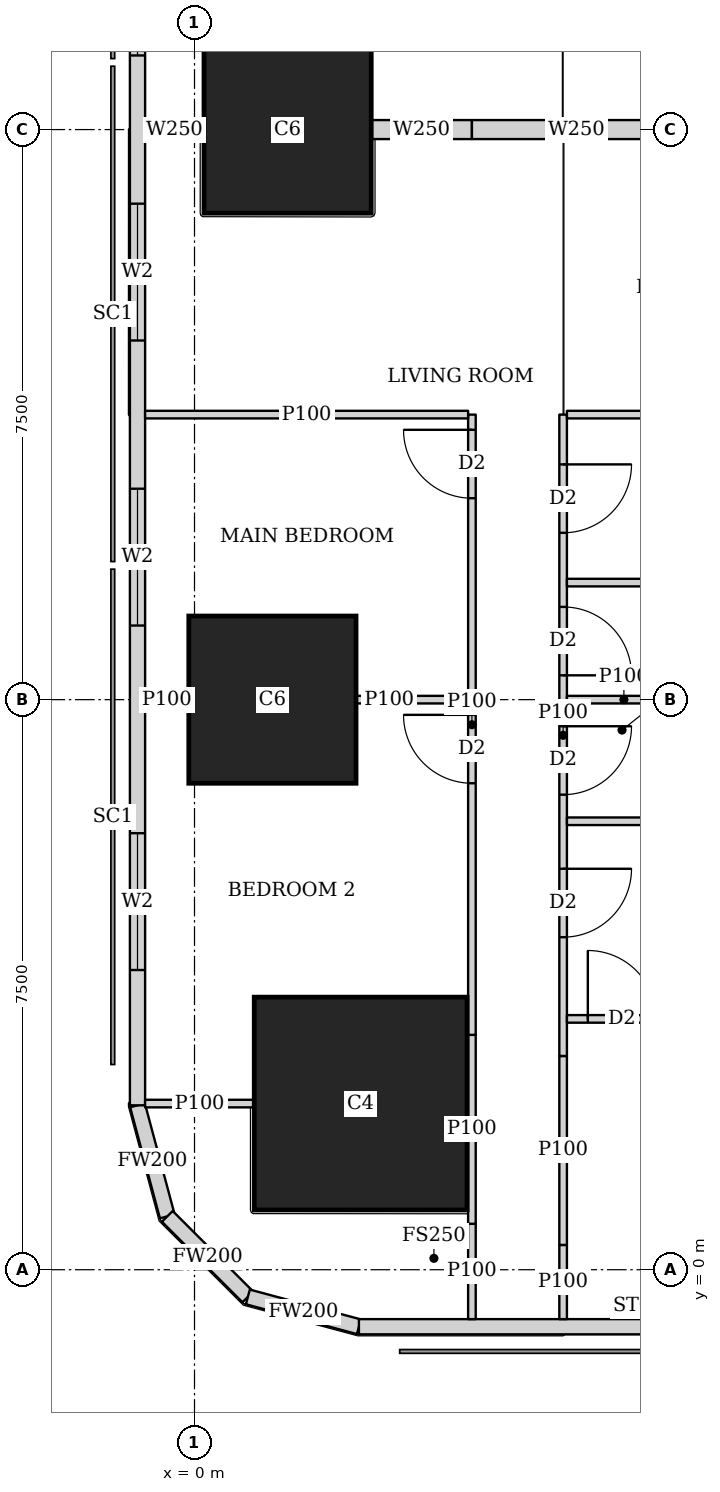
"""IFC4 building model, lengths in metres.
Left out: names, types, materials, properties, quantities, classifications, styles, units other than length and angle.
Written with IfcOpenShell. Run it as: python <this file> out.ifc"""

import sys

from ifc_helpers import new_model, si_unit, direction, frame, frame_2d, origin, origin_2d, place, context, subcontext, project, spatial, rectangle, extrude, element, fill, save


model = new_model("IFC4")
c1 = context("Model", 3, precision=1e-05, world=origin(), true_north=direction((0.0, 1.0)))
c2 = subcontext(c1, "Body", "Model", "MODEL_VIEW")
j1 = project(units=[si_unit("LENGTHUNIT", "METRE"), si_unit("PLANEANGLEUNIT", "RADIAN")], contexts=[c1])
p1 = place(None, origin())
s1 = spatial("IfcSite", under=j1, at=p1, CompositionType="ELEMENT")
p2 = place(p1, origin())
s2 = spatial("IfcBuilding", under=s1, at=p2, CompositionType="ELEMENT")
p3 = place(p2, frame((0.0, 0.0, 126.65)))
s3 = spatial("IfcBuildingStorey", under=s2, at=p3, CompositionType="ELEMENT", Elevation=126.65)
p4 = place(p3, frame((2.186, 2.186, 0.0), z_axis=(0.0, 0.0, 1.0), x_axis=(1.0, 0.0, 0.0)))
e1 = element("IfcColumn", 1, at=p4, inside=s3, PredefinedType="COLUMN", context=c2, shape_type="SweptSolid", body=[
    extrude(rectangle(XDim=2.8, YDim=2.8, at=origin_2d()), origin(), (0.0, 0.0, 1.0), 3.75),
])
for number, where, z_axis, x_axis in (
    (2, (1.025, 7.5, 0.0), (0.0, 0.0, 1.0), (1.0, 0.0, 0.0)),
    (3, (1.225, 15.0, 0.0), (0.0, 0.0, 1.0), (1.0, 0.0, 0.0)),
):
    element("IfcColumn", number, at=place(p3, frame(where, z_axis=z_axis, x_axis=x_axis)), inside=s3, PredefinedType="COLUMN", context=c2, shape_type="SweptSolid", body=[
        extrude(rectangle(XDim=2.2, YDim=2.2, at=origin_2d()), origin(), (0.0, 0.0, 1.0), 3.75),
    ])
p5 = place(p3, frame((2.163, -0.75, 0.0), z_axis=(0.0, 0.0, 1.0), x_axis=(1.0, 0.0, 0.0)))
e4 = element("IfcWall", 4, at=p5, inside=s3, PredefinedType="SOLIDWALL", context=c2, shape_type="SweptSolid", body=[
    extrude(rectangle(XDim=45.628, YDim=0.2, at=frame_2d((22.814, 0.0))), origin(), (0.0, 0.0, 1.0), 3.45),
])
p6 = place(p5, frame((9.537, 0.0, 0.9)))
e5 = element("IfcOpeningElement", 5, at=p6, cuts=e4, PredefinedType="OPENING", context=c2, shape_type="SweptSolid", body=[
    extrude(rectangle(XDim=1.8, YDim=1.5, at=frame_2d((0.9, 0.75))), frame((0.0, 0.11, 0.0), z_axis=(0.0, -1.0, 0.0), x_axis=(1.0, 0.0, 0.0)), (0.0, 0.0, 1.0), 0.22),
])
p7 = place(p5, frame((13.137, 0.0, 0.9)))
e6 = element("IfcOpeningElement", 6, at=p7, cuts=e4, PredefinedType="OPENING", context=c2, shape_type="SweptSolid", body=[
    extrude(rectangle(XDim=1.8, YDim=1.5, at=frame_2d((0.9, 0.75))), frame((0.0, 0.11, 0.0), z_axis=(0.0, -1.0, 0.0), x_axis=(1.0, 0.0, 0.0)), (0.0, 0.0, 1.0), 0.22),
])
p8 = place(p5, frame((16.737, 0.0, 0.9)))
e7 = element("IfcOpeningElement", 7, at=p8, cuts=e4, PredefinedType="OPENING", context=c2, shape_type="SweptSolid", body=[
    extrude(rectangle(XDim=1.8, YDim=1.5, at=frame_2d((0.9, 0.75))), frame((0.0, 0.11, 0.0), z_axis=(0.0, -1.0, 0.0), x_axis=(1.0, 0.0, 0.0)), (0.0, 0.0, 1.0), 0.22),
])
p9 = place(p5, frame((20.337, 0.0, 0.9)))
e8 = element("IfcOpeningElement", 8, at=p9, cuts=e4, PredefinedType="OPENING", context=c2, shape_type="SweptSolid", body=[
    extrude(rectangle(XDim=1.8, YDim=1.5, at=frame_2d((0.9, 0.75))), frame((0.0, 0.11, 0.0), z_axis=(0.0, -1.0, 0.0), x_axis=(1.0, 0.0, 0.0)), (0.0, 0.0, 1.0), 0.22),
])
p10 = place(p5, frame((23.937, 0.0, 0.9)))
e9 = element("IfcOpeningElement", 9, at=p10, cuts=e4, PredefinedType="OPENING", context=c2, shape_type="SweptSolid", body=[
    extrude(rectangle(XDim=1.8, YDim=1.5, at=frame_2d((0.9, 0.75))), frame((0.0, 0.11, 0.0), z_axis=(0.0, -1.0, 0.0), x_axis=(1.0, 0.0, 0.0)), (0.0, 0.0, 1.0), 0.22),
])
p11 = place(p5, frame((27.537, 0.0, 0.9)))
e10 = element("IfcOpeningElement", 10, at=p11, cuts=e4, PredefinedType="OPENING", context=c2, shape_type="SweptSolid", body=[
    extrude(rectangle(XDim=1.8, YDim=1.5, at=frame_2d((0.9, 0.75))), frame((0.0, 0.11, 0.0), z_axis=(0.0, -1.0, 0.0), x_axis=(1.0, 0.0, 0.0)), (0.0, 0.0, 1.0), 0.22),
])
p12 = place(p5, frame((31.137, 0.0, 0.9)))
e11 = element("IfcOpeningElement", 11, at=p12, cuts=e4, PredefinedType="OPENING", context=c2, shape_type="SweptSolid", body=[
    extrude(rectangle(XDim=1.8, YDim=1.5, at=frame_2d((0.9, 0.75))), frame((0.0, 0.11, 0.0), z_axis=(0.0, -1.0, 0.0), x_axis=(1.0, 0.0, 0.0)), (0.0, 0.0, 1.0), 0.22),
])
p13 = place(p5, frame((34.737, 0.0, 0.9)))
e12 = element("IfcOpeningElement", 12, at=p13, cuts=e4, PredefinedType="OPENING", context=c2, shape_type="SweptSolid", body=[
    extrude(rectangle(XDim=1.8, YDim=1.5, at=frame_2d((0.9, 0.75))), frame((0.0, 0.11, 0.0), z_axis=(0.0, -1.0, 0.0), x_axis=(1.0, 0.0, 0.0)), (0.0, 0.0, 1.0), 0.22),
])
p14 = place(p3, frame((-0.75, 42.837, 0.0), z_axis=(0.0, 0.0, 1.0), x_axis=(0.0, -1.0, 0.0)))
e13 = element("IfcWall", 13, at=p14, inside=s3, PredefinedType="SOLIDWALL", context=c2, shape_type="SweptSolid", body=[
    extrude(rectangle(XDim=40.674, YDim=0.2, at=frame_2d((20.337, 0.0))), origin(), (0.0, 0.0, 1.0), 3.45),
])
p15 = place(p14, frame((1.78, 0.0, 0.9)))
e14 = element("IfcOpeningElement", 14, at=p15, cuts=e13, PredefinedType="OPENING", context=c2, shape_type="SweptSolid", body=[
    extrude(rectangle(XDim=1.8, YDim=1.5, at=frame_2d((0.9, 0.75))), frame((0.0, 0.11, 0.0), z_axis=(0.0, -1.0, 0.0), x_axis=(1.0, 0.0, 0.0)), (0.0, 0.0, 1.0), 0.22),
])
p16 = place(p14, frame((6.312, 0.0, 0.9)))
e15 = element("IfcOpeningElement", 15, at=p16, cuts=e13, PredefinedType="OPENING", context=c2, shape_type="SweptSolid", body=[
    extrude(rectangle(XDim=1.8, YDim=1.5, at=frame_2d((0.9, 0.75))), frame((0.0, 0.11, 0.0), z_axis=(0.0, -1.0, 0.0), x_axis=(1.0, 0.0, 0.0)), (0.0, 0.0, 1.0), 0.22),
])
p17 = place(p14, frame((10.062, 0.0, 0.9)))
e16 = element("IfcOpeningElement", 16, at=p17, cuts=e13, PredefinedType="OPENING", context=c2, shape_type="SweptSolid", body=[
    extrude(rectangle(XDim=1.8, YDim=1.5, at=frame_2d((0.9, 0.75))), frame((0.0, 0.11, 0.0), z_axis=(0.0, -1.0, 0.0), x_axis=(1.0, 0.0, 0.0)), (0.0, 0.0, 1.0), 0.22),
])
p18 = place(p14, frame((13.812, 0.0, 0.9)))
e17 = element("IfcOpeningElement", 17, at=p18, cuts=e13, PredefinedType="OPENING", context=c2, shape_type="SweptSolid", body=[
    extrude(rectangle(XDim=1.8, YDim=1.5, at=frame_2d((0.9, 0.75))), frame((0.0, 0.11, 0.0), z_axis=(0.0, -1.0, 0.0), x_axis=(1.0, 0.0, 0.0)), (0.0, 0.0, 1.0), 0.22),
])
p19 = place(p14, frame((17.562, 0.0, 0.9)))
e18 = element("IfcOpeningElement", 18, at=p19, cuts=e13, PredefinedType="OPENING", context=c2, shape_type="SweptSolid", body=[
    extrude(rectangle(XDim=1.8, YDim=1.5, at=frame_2d((0.9, 0.75))), frame((0.0, 0.11, 0.0), z_axis=(0.0, -1.0, 0.0), x_axis=(1.0, 0.0, 0.0)), (0.0, 0.0, 1.0), 0.22),
])
p20 = place(p14, frame((21.312, 0.0, 0.9)))
e19 = element("IfcOpeningElement", 19, at=p20, cuts=e13, PredefinedType="OPENING", context=c2, shape_type="SweptSolid", body=[
    extrude(rectangle(XDim=1.8, YDim=1.5, at=frame_2d((0.9, 0.75))), frame((0.0, 0.11, 0.0), z_axis=(0.0, -1.0, 0.0), x_axis=(1.0, 0.0, 0.0)), (0.0, 0.0, 1.0), 0.22),
])
p21 = place(p14, frame((25.062, 0.0, 0.9)))
e20 = element("IfcOpeningElement", 20, at=p21, cuts=e13, PredefinedType="OPENING", context=c2, shape_type="SweptSolid", body=[
    extrude(rectangle(XDim=1.8, YDim=1.5, at=frame_2d((0.9, 0.75))), frame((0.0, 0.11, 0.0), z_axis=(0.0, -1.0, 0.0), x_axis=(1.0, 0.0, 0.0)), (0.0, 0.0, 1.0), 0.22),
])
p22 = place(p14, frame((28.812, 0.0, 0.9)))
e21 = element("IfcOpeningElement", 21, at=p22, cuts=e13, PredefinedType="OPENING", context=c2, shape_type="SweptSolid", body=[
    extrude(rectangle(XDim=1.8, YDim=1.5, at=frame_2d((0.9, 0.75))), frame((0.0, 0.11, 0.0), z_axis=(0.0, -1.0, 0.0), x_axis=(1.0, 0.0, 0.0)), (0.0, 0.0, 1.0), 0.22),
])
p23 = place(p14, frame((32.562, 0.0, 0.9)))
e22 = element("IfcOpeningElement", 22, at=p23, cuts=e13, PredefinedType="OPENING", context=c2, shape_type="SweptSolid", body=[
    extrude(rectangle(XDim=1.8, YDim=1.5, at=frame_2d((0.9, 0.75))), frame((0.0, 0.11, 0.0), z_axis=(0.0, -1.0, 0.0), x_axis=(1.0, 0.0, 0.0)), (0.0, 0.0, 1.0), 0.22),
])
p24 = place(p14, frame((37.094, 0.0, 0.9)))
e23 = element("IfcOpeningElement", 23, at=p24, cuts=e13, PredefinedType="OPENING", context=c2, shape_type="SweptSolid", body=[
    extrude(rectangle(XDim=1.8, YDim=1.5, at=frame_2d((0.9, 0.75))), frame((0.0, 0.11, 0.0), z_axis=(0.0, -1.0, 0.0), x_axis=(1.0, 0.0, 0.0)), (0.0, 0.0, 1.0), 0.22),
])
p25 = place(p3, frame((-0.75, 2.163, 0.0), z_axis=(0.0, 0.0, 1.0), x_axis=(0.259168954497, -0.965832000415, 0.0)))
e24 = element("IfcWall", 24, at=p25, inside=s3, PredefinedType="SOLIDWALL", context=c2, shape_type="SweptSolid", body=[
    extrude(rectangle(XDim=1.513, YDim=0.2, at=frame_2d((0.756, 0.0))), origin(), (0.0, 0.0, 1.0), 3.45),
])
p26 = place(p3, frame((-0.358, 0.702, 0.0), z_axis=(0.0, 0.0, 1.0), x_axis=(0.707106781187, -0.707106781187, 0.0)))
e25 = element("IfcWall", 25, at=p26, inside=s3, PredefinedType="SOLIDWALL", context=c2, shape_type="SweptSolid", body=[
    extrude(rectangle(XDim=1.499, YDim=0.2, at=frame_2d((0.75, 0.0))), origin(), (0.0, 0.0, 1.0), 3.45),
])
p27 = place(p3, frame((0.702, -0.358, 0.0), z_axis=(0.0, 0.0, 1.0), x_axis=(0.965832000415, -0.259168954497, 0.0)))
e26 = element("IfcWall", 26, at=p27, inside=s3, PredefinedType="SOLIDWALL", context=c2, shape_type="SweptSolid", body=[
    extrude(rectangle(XDim=1.513, YDim=0.2, at=frame_2d((0.756, 0.0))), origin(), (0.0, 0.0, 1.0), 3.45),
])
p28 = place(p3, frame((3.65, -0.65, 0.0), z_axis=(0.0, 0.0, 1.0), x_axis=(0.0, 1.0, 0.0)))
e27 = element("IfcWall", 27, at=p28, inside=s3, PredefinedType="PARTITIONING", context=c2, shape_type="SweptSolid", body=[
    extrude(rectangle(XDim=1.254, YDim=0.1, at=frame_2d((0.627, 0.0))), origin(), (0.0, 0.0, 1.0), 3.45),
])
p29 = place(p3, frame((3.65, 0.604, 0.0), z_axis=(0.0, 0.0, 1.0), x_axis=(0.0, 1.0, 0.0)))
e28 = element("IfcWall", 28, at=p29, inside=s3, PredefinedType="PARTITIONING", context=c2, shape_type="SweptSolid", body=[
    extrude(rectangle(XDim=2.486, YDim=0.1, at=frame_2d((1.243, 0.0))), origin(), (0.0, 0.0, 1.0), 2.0),
])
p30 = place(p3, frame((3.65, 3.09, 0.0), z_axis=(0.0, 0.0, 1.0), x_axis=(0.0, 1.0, 0.0)))
e29 = element("IfcWall", 29, at=p30, inside=s3, PredefinedType="PARTITIONING", context=c2, shape_type="SweptSolid", body=[
    extrude(rectangle(XDim=8.16, YDim=0.1, at=frame_2d((4.08, 0.0))), origin(), (0.0, 0.0, 1.0), 3.45),
])
p31 = place(p30, frame((7.06, 0.0, 0.0)))
e30 = element("IfcOpeningElement", 30, at=p31, cuts=e29, PredefinedType="OPENING", context=c2, shape_type="SweptSolid", body=[
    extrude(rectangle(XDim=0.9, YDim=2.1, at=frame_2d((0.45, 1.05))), frame((0.0, 0.06, 0.0), z_axis=(0.0, -1.0, 0.0), x_axis=(1.0, 0.0, 0.0)), (0.0, 0.0, 1.0), 0.12),
])
p32 = place(p30, frame((3.31, 0.0, 0.0)))
e31 = element("IfcOpeningElement", 31, at=p32, cuts=e29, PredefinedType="OPENING", context=c2, shape_type="SweptSolid", body=[
    extrude(rectangle(XDim=0.9, YDim=2.1, at=frame_2d((0.45, 1.05))), frame((0.0, 0.06, 0.0), z_axis=(0.0, -1.0, 0.0), x_axis=(1.0, 0.0, 0.0)), (0.0, 0.0, 1.0), 0.12),
])
p33 = place(p3, frame((4.85, -0.65, 0.0), z_axis=(0.0, 0.0, 1.0), x_axis=(0.0, 1.0, 0.0)))
e32 = element("IfcWall", 32, at=p33, inside=s3, PredefinedType="PARTITIONING", context=c2, shape_type="SweptSolid", body=[
    extrude(rectangle(XDim=0.976, YDim=0.1, at=frame_2d((0.488, 0.0))), origin(), (0.0, 0.0, 1.0), 3.45),
])
p34 = place(p3, frame((4.85, 0.326, 0.0), z_axis=(0.0, 0.0, 1.0), x_axis=(0.0, 1.0, 0.0)))
e33 = element("IfcWall", 33, at=p34, inside=s3, PredefinedType="PARTITIONING", context=c2, shape_type="SweptSolid", body=[
    extrude(rectangle(XDim=2.486, YDim=0.1, at=frame_2d((1.243, 0.0))), origin(), (0.0, 0.0, 1.0), 2.0),
])
p35 = place(p3, frame((4.85, 2.812, 0.0), z_axis=(0.0, 0.0, 1.0), x_axis=(0.0, 1.0, 0.0)))
e34 = element("IfcWall", 34, at=p35, inside=s3, PredefinedType="PARTITIONING", context=c2, shape_type="SweptSolid", body=[
    extrude(rectangle(XDim=8.438, YDim=0.1, at=frame_2d((4.219, 0.0))), origin(), (0.0, 0.0, 1.0), 3.45),
])
p36 = place(p35, frame((6.883, 0.0, 0.0)))
e35 = element("IfcOpeningElement", 35, at=p36, cuts=e34, PredefinedType="OPENING", context=c2, shape_type="SweptSolid", body=[
    extrude(rectangle(XDim=0.9, YDim=2.1, at=frame_2d((0.45, 1.05))), frame((0.0, 0.06, 0.0), z_axis=(0.0, -1.0, 0.0), x_axis=(1.0, 0.0, 0.0)), (0.0, 0.0, 1.0), 0.12),
])
p37 = place(p35, frame((3.438, 0.0, 0.0)))
e36 = element("IfcOpeningElement", 36, at=p37, cuts=e34, PredefinedType="OPENING", context=c2, shape_type="SweptSolid", body=[
    extrude(rectangle(XDim=0.9, YDim=2.1, at=frame_2d((0.45, 1.05))), frame((0.0, 0.06, 0.0), z_axis=(0.0, -1.0, 0.0), x_axis=(1.0, 0.0, 0.0)), (0.0, 0.0, 1.0), 0.12),
])
p38 = place(p35, frame((5.008, 0.0, 0.0)))
e37 = element("IfcOpeningElement", 37, at=p38, cuts=e34, PredefinedType="OPENING", context=c2, shape_type="SweptSolid", body=[
    extrude(rectangle(XDim=0.9, YDim=2.1, at=frame_2d((0.45, 1.05))), frame((0.0, 0.06, 0.0), z_axis=(0.0, -1.0, 0.0), x_axis=(1.0, 0.0, 0.0)), (0.0, 0.0, 1.0), 0.12),
])
p39 = place(p35, frame((1.563, 0.0, 0.0)))
e38 = element("IfcOpeningElement", 38, at=p39, cuts=e34, PredefinedType="OPENING", context=c2, shape_type="SweptSolid", body=[
    extrude(rectangle(XDim=0.9, YDim=2.1, at=frame_2d((0.45, 1.05))), frame((0.0, 0.06, 0.0), z_axis=(0.0, -1.0, 0.0), x_axis=(1.0, 0.0, 0.0)), (0.0, 0.0, 1.0), 0.12),
])
p40 = place(p3, frame((-0.65, 2.186, 0.0), z_axis=(0.0, 0.0, 1.0), x_axis=(1.0, 0.0, 0.0)))
e39 = element("IfcWall", 39, at=p40, inside=s3, PredefinedType="PARTITIONING", context=c2, shape_type="SweptSolid", body=[
    extrude(rectangle(XDim=1.435, YDim=0.1, at=frame_2d((0.717, 0.0))), origin(), (0.0, 0.0, 1.0), 3.45),
])
p41 = place(p3, frame((-0.65, 7.5, 0.0), z_axis=(0.0, 0.0, 1.0), x_axis=(1.0, 0.0, 0.0)))
e40 = element("IfcWall", 40, at=p41, inside=s3, PredefinedType="PARTITIONING", context=c2, shape_type="SweptSolid", body=[
    extrude(rectangle(XDim=0.574, YDim=0.1, at=frame_2d((0.287, 0.0))), origin(), (0.0, 0.0, 1.0), 2.0),
])
p42 = place(p3, frame((2.126, 7.5, 0.0), z_axis=(0.0, 0.0, 1.0), x_axis=(1.0, 0.0, 0.0)))
e41 = element("IfcWall", 41, at=p42, inside=s3, PredefinedType="PARTITIONING", context=c2, shape_type="SweptSolid", body=[
    extrude(rectangle(XDim=1.474, YDim=0.1, at=frame_2d((0.737, 0.0))), origin(), (0.0, 0.0, 1.0), 2.0),
])
p43 = place(p3, frame((-0.65, 11.25, 0.0), z_axis=(0.0, 0.0, 1.0), x_axis=(1.0, 0.0, 0.0)))
e42 = element("IfcWall", 42, at=p43, inside=s3, PredefinedType="PARTITIONING", context=c2, shape_type="SweptSolid", body=[
    extrude(rectangle(XDim=4.25, YDim=0.1, at=frame_2d((2.125, 0.0))), origin(), (0.0, 0.0, 1.0), 2.15),
])
p44 = place(p3, frame((4.9, 7.5, 0.0), z_axis=(0.0, 0.0, 1.0), x_axis=(1.0, 0.0, 0.0)))
e43 = element("IfcWall", 43, at=p44, inside=s3, PredefinedType="PARTITIONING", context=c2, shape_type="SweptSolid", body=[
    extrude(rectangle(XDim=1.499, YDim=0.1, at=frame_2d((0.75, 0.0))), origin(), (0.0, 0.0, 1.0), 3.45),
])
for number, where, z_axis, x_axis in (
    (44, (4.9, 11.25, 0.0), (0.0, 0.0, 1.0), (1.0, 0.0, 0.0)),
    (45, (4.9, 9.04, 0.0), (0.0, 0.0, 1.0), (1.0, 0.0, 0.0)),
    (46, (4.9, 5.9, 0.0), (0.0, 0.0, 1.0), (1.0, 0.0, 0.0)),
):
    element("IfcWall", number, at=place(p3, frame(where, z_axis=z_axis, x_axis=x_axis)), inside=s3, PredefinedType="PARTITIONING", context=c2, shape_type="SweptSolid", body=[
        extrude(rectangle(XDim=3.275, YDim=0.1, at=frame_2d((1.638, 0.0))), origin(), (0.0, 0.0, 1.0), 3.45),
    ])
p45 = place(p3, frame((-0.65, 15.0, 0.0), z_axis=(0.0, 0.0, 1.0), x_axis=(1.0, 0.0, 0.0)))
e47 = element("IfcWall", 47, at=p45, inside=s3, PredefinedType="SOLIDWALL", context=c2, shape_type="SweptSolid", body=[
    extrude(rectangle(XDim=0.774, YDim=0.25, at=frame_2d((0.387, 0.0))), origin(), (0.0, 0.0, 1.0), 3.45),
])
p46 = place(p3, frame((2.326, 15.0, 0.0), z_axis=(0.0, 0.0, 1.0), x_axis=(1.0, 0.0, 0.0)))
e48 = element("IfcWall", 48, at=p46, inside=s3, PredefinedType="SOLIDWALL", context=c2, shape_type="SweptSolid", body=[
    extrude(rectangle(XDim=1.324, YDim=0.25, at=frame_2d((0.662, 0.0))), origin(), (0.0, 0.0, 1.0), 3.45),
])
p47 = place(p3, frame((3.65, 15.0, 0.0), z_axis=(0.0, 0.0, 1.0), x_axis=(1.0, 0.0, 0.0)))
e49 = element("IfcWall", 49, at=p47, inside=s3, PredefinedType="SOLIDWALL", context=c2, shape_type="SweptSolid", body=[
    extrude(rectangle(XDim=2.749, YDim=0.25, at=frame_2d((1.375, 0.0))), origin(), (0.0, 0.0, 1.0), 3.45),
])
p48 = place(p3, frame((8.175, 3.3, 0.0), z_axis=(0.0, 0.0, 1.0), x_axis=(-1.0, 0.0, 0.0)))
e50 = element("IfcWall", 50, at=p48, inside=s3, PredefinedType="PARTITIONING", context=c2, shape_type="SweptSolid", body=[
    extrude(rectangle(XDim=3.275, YDim=0.1, at=frame_2d((1.638, 0.0))), origin(), (0.0, 0.0, 1.0), 3.45),
])
p49 = place(p48, frame((2.1, 0.0, 0.0)))
e51 = element("IfcOpeningElement", 51, at=p49, cuts=e50, PredefinedType="OPENING", context=c2, shape_type="SweptSolid", body=[
    extrude(rectangle(XDim=0.9, YDim=2.1, at=frame_2d((0.45, 1.05))), frame((0.0, 0.06, 0.0), z_axis=(0.0, -1.0, 0.0), x_axis=(1.0, 0.0, 0.0)), (0.0, 0.0, 1.0), 0.12),
])
p50 = place(p21, origin())
e52 = element("IfcWindow", 52, at=p50, inside=s3, PartitioningType="SINGLE_PANEL", PredefinedType="WINDOW", context=c2, shape_type="SweptSolid", body=[
    extrude(rectangle(XDim=1.8, YDim=1.5, at=frame_2d((0.9, 0.75))), frame((0.0, 0.03, 0.0), z_axis=(0.0, -1.0, 0.0), x_axis=(1.0, 0.0, 0.0)), (0.0, 0.0, 1.0), 0.06),
])
fill(e20, e52)
p51 = place(p22, origin())
e53 = element("IfcWindow", 53, at=p51, inside=s3, PartitioningType="SINGLE_PANEL", PredefinedType="WINDOW", context=c2, shape_type="SweptSolid", body=[
    extrude(rectangle(XDim=1.8, YDim=1.5, at=frame_2d((0.9, 0.75))), frame((0.0, 0.03, 0.0), z_axis=(0.0, -1.0, 0.0), x_axis=(1.0, 0.0, 0.0)), (0.0, 0.0, 1.0), 0.06),
])
fill(e21, e53)
p52 = place(p23, origin())
e54 = element("IfcWindow", 54, at=p52, inside=s3, PartitioningType="SINGLE_PANEL", PredefinedType="WINDOW", context=c2, shape_type="SweptSolid", body=[
    extrude(rectangle(XDim=1.8, YDim=1.5, at=frame_2d((0.9, 0.75))), frame((0.0, 0.03, 0.0), z_axis=(0.0, -1.0, 0.0), x_axis=(1.0, 0.0, 0.0)), (0.0, 0.0, 1.0), 0.06),
])
fill(e22, e54)
p53 = place(p24, origin())
e55 = element("IfcWindow", 55, at=p53, inside=s3, PartitioningType="SINGLE_PANEL", PredefinedType="WINDOW", context=c2, shape_type="SweptSolid", body=[
    extrude(rectangle(XDim=1.8, YDim=1.5, at=frame_2d((0.9, 0.75))), frame((0.0, 0.03, 0.0), z_axis=(0.0, -1.0, 0.0), x_axis=(1.0, 0.0, 0.0)), (0.0, 0.0, 1.0), 0.06),
])
fill(e23, e55)
p54 = place(p31, origin())
e56 = element("IfcDoor", 56, at=p54, inside=s3, OperationType="SINGLE_SWING_RIGHT", PredefinedType="DOOR", context=c2, shape_type="SweptSolid", body=[
    extrude(rectangle(XDim=0.9, YDim=2.1, at=frame_2d((0.45, 1.05))), frame((0.0, 0.025, 0.0), z_axis=(0.0, -1.0, 0.0), x_axis=(1.0, 0.0, 0.0)), (0.0, 0.0, 1.0), 0.05),
])
fill(e30, e56)
p55 = place(p32, origin())
e57 = element("IfcDoor", 57, at=p55, inside=s3, OperationType="SINGLE_SWING_RIGHT", PredefinedType="DOOR", context=c2, shape_type="SweptSolid", body=[
    extrude(rectangle(XDim=0.9, YDim=2.1, at=frame_2d((0.45, 1.05))), frame((0.0, 0.025, 0.0), z_axis=(0.0, -1.0, 0.0), x_axis=(1.0, 0.0, 0.0)), (0.0, 0.0, 1.0), 0.05),
])
fill(e31, e57)
p56 = place(p36, origin())
e58 = element("IfcDoor", 58, at=p56, inside=s3, OperationType="SINGLE_SWING_LEFT", PredefinedType="DOOR", context=c2, shape_type="SweptSolid", body=[
    extrude(rectangle(XDim=0.9, YDim=2.1, at=frame_2d((0.45, 1.05))), frame((0.0, 0.025, 0.0), z_axis=(0.0, -1.0, 0.0), x_axis=(1.0, 0.0, 0.0)), (0.0, 0.0, 1.0), 0.05),
])
fill(e35, e58)
p57 = place(p37, origin())
e59 = element("IfcDoor", 59, at=p57, inside=s3, OperationType="SINGLE_SWING_LEFT", PredefinedType="DOOR", context=c2, shape_type="SweptSolid", body=[
    extrude(rectangle(XDim=0.9, YDim=2.1, at=frame_2d((0.45, 1.05))), frame((0.0, 0.025, 0.0), z_axis=(0.0, -1.0, 0.0), x_axis=(1.0, 0.0, 0.0)), (0.0, 0.0, 1.0), 0.05),
])
fill(e36, e59)
p58 = place(p38, origin())
e60 = element("IfcDoor", 60, at=p58, inside=s3, OperationType="SINGLE_SWING_RIGHT", PredefinedType="DOOR", context=c2, shape_type="SweptSolid", body=[
    extrude(rectangle(XDim=0.9, YDim=2.1, at=frame_2d((0.45, 1.05))), frame((0.0, 0.025, 0.0), z_axis=(0.0, -1.0, 0.0), x_axis=(1.0, 0.0, 0.0)), (0.0, 0.0, 1.0), 0.05),
])
fill(e37, e60)
p59 = place(p39, origin())
e61 = element("IfcDoor", 61, at=p59, inside=s3, OperationType="SINGLE_SWING_LEFT", PredefinedType="DOOR", context=c2, shape_type="SweptSolid", body=[
    extrude(rectangle(XDim=0.9, YDim=2.1, at=frame_2d((0.45, 1.05))), frame((0.0, 0.025, 0.0), z_axis=(0.0, -1.0, 0.0), x_axis=(1.0, 0.0, 0.0)), (0.0, 0.0, 1.0), 0.05),
])
fill(e38, e61)
p60 = place(p49, origin())
e62 = element("IfcDoor", 62, at=p60, inside=s3, OperationType="SINGLE_SWING_LEFT", PredefinedType="DOOR", context=c2, shape_type="SweptSolid", body=[
    extrude(rectangle(XDim=0.9, YDim=2.1, at=frame_2d((0.45, 1.05))), frame((0.0, 0.025, 0.0), z_axis=(0.0, -1.0, 0.0), x_axis=(1.0, 0.0, 0.0)), (0.0, 0.0, 1.0), 0.05),
])
fill(e51, e62)
save(model, sys.argv[1])
